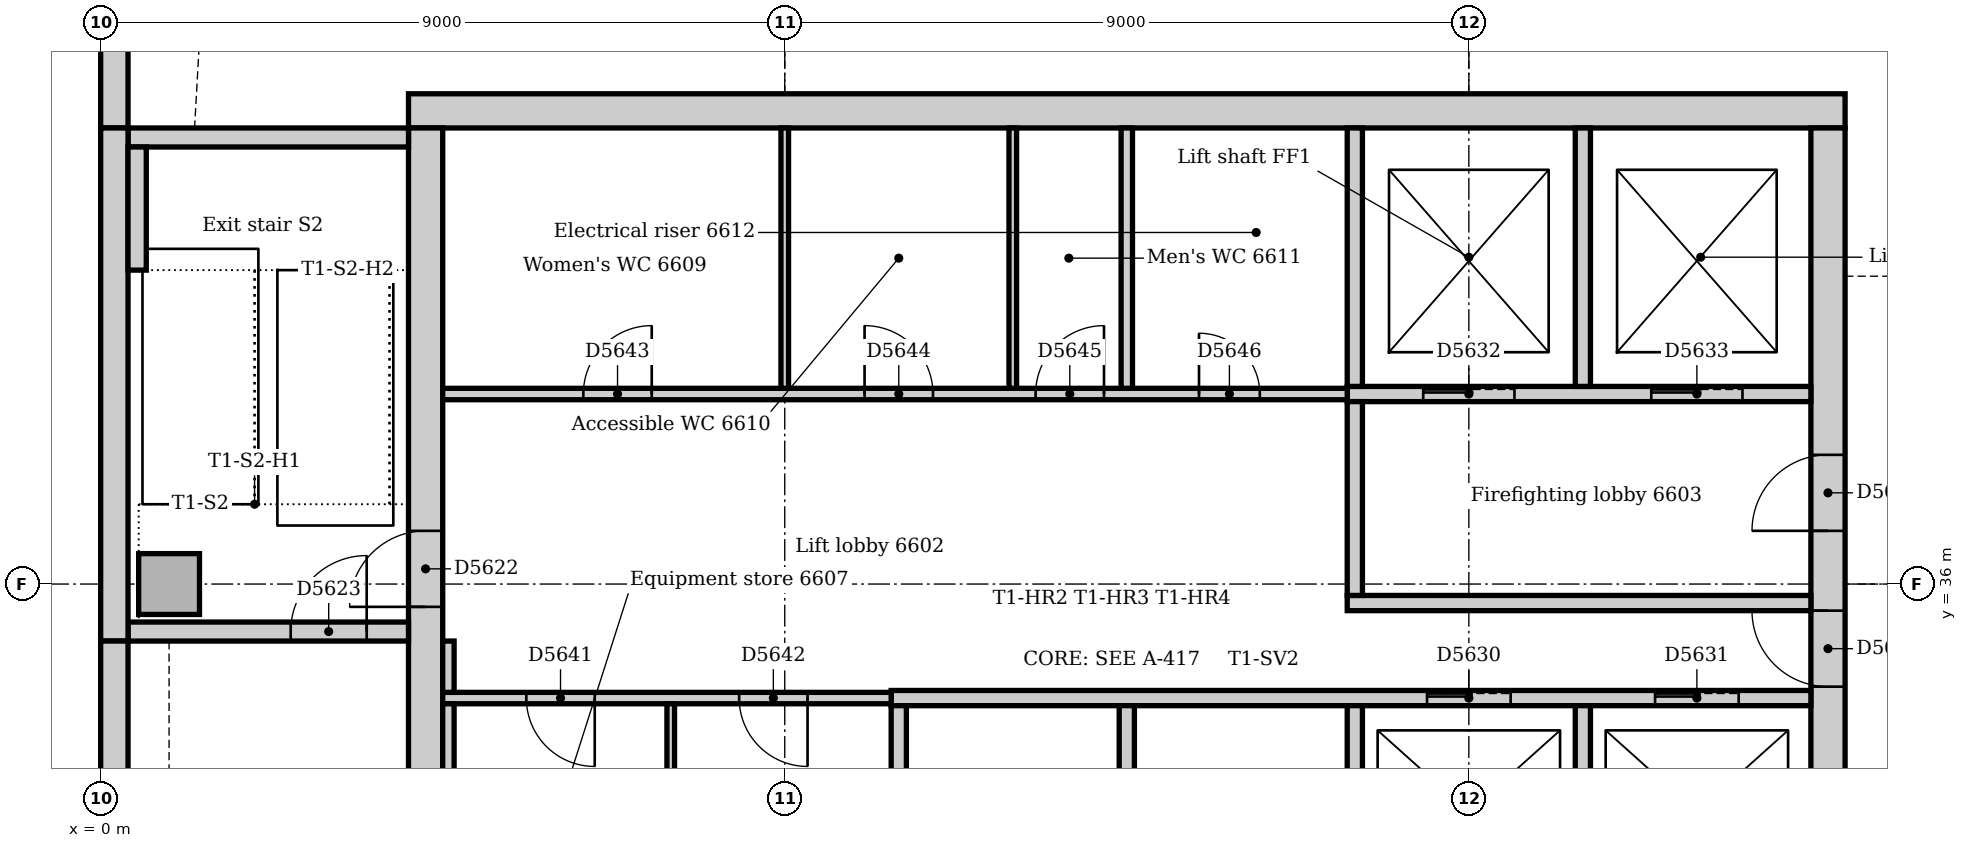
"""IFC4 building model, lengths in metres.
Left out: names, types, materials, properties, quantities, classifications, styles, units other than length and angle.
Written with IfcOpenShell. Run it as: python <this file> out.ifc"""

import sys

from ifc_helpers import new_model, si_unit, direction, frame, frame_2d, origin, origin_2d, place, context, subcontext, project, spatial, rectangle, extrude, element, fill, save


model = new_model("IFC4")
c1 = context("Model", 3, precision=1e-05, world=origin(), true_north=direction((0.0, 1.0)))
c2 = subcontext(c1, "Body", "Model", "MODEL_VIEW")
j1 = project(units=[si_unit("LENGTHUNIT", "METRE"), si_unit("PLANEANGLEUNIT", "RADIAN")], contexts=[c1])
p1 = place(None, origin())
s1 = spatial("IfcSite", under=j1, at=p1, CompositionType="ELEMENT")
p2 = place(p1, origin())
s2 = spatial("IfcBuilding", under=s1, at=p2, CompositionType="ELEMENT")
p3 = place(p2, frame((0.0, 0.0, 275.0)))
s3 = spatial("IfcBuildingStorey", under=s2, at=p3, CompositionType="ELEMENT", Elevation=275.0)
p4 = place(p3, frame((22.95, 42.225, 0.0), z_axis=(0.0, 0.0, 1.0), x_axis=(-1.0, 0.0, 0.0)))
e1 = element("IfcWall", 1, at=p4, inside=s3, PredefinedType="SOLIDWALL", context=c2, shape_type="SweptSolid", body=[
    extrude(rectangle(XDim=18.9, YDim=0.45, at=frame_2d((9.45, 0.0))), origin(), (0.0, 0.0, 1.0), 4.0),
])
p5 = place(p3, frame((22.725, 31.5, 0.0), z_axis=(0.0, 0.0, 1.0), x_axis=(0.0, 1.0, 0.0)))
e2 = element("IfcWall", 2, at=p5, inside=s3, PredefinedType="SOLIDWALL", context=c2, shape_type="SweptSolid", body=[
    extrude(rectangle(XDim=10.5, YDim=0.45, at=frame_2d((5.25, 0.0))), origin(), (0.0, 0.0, 1.0), 4.0),
])
p6 = place(p5, frame((3.15, 0.0, 0.0)))
e3 = element("IfcOpeningElement", 3, at=p6, cuts=e2, PredefinedType="OPENING", context=c2, shape_type="SweptSolid", body=[
    extrude(rectangle(XDim=1.0, YDim=2.1, at=frame_2d((0.5, 1.05))), frame((0.0, 0.235, 0.0), z_axis=(0.0, -1.0, 0.0), x_axis=(1.0, 0.0, 0.0)), (0.0, 0.0, 1.0), 0.47),
])
p7 = place(p5, frame((5.2, 0.0, 0.0)))
e4 = element("IfcOpeningElement", 4, at=p7, cuts=e2, PredefinedType="OPENING", context=c2, shape_type="SweptSolid", body=[
    extrude(rectangle(XDim=1.0, YDim=2.1, at=frame_2d((0.5, 1.05))), frame((0.0, 0.235, 0.0), z_axis=(0.0, -1.0, 0.0), x_axis=(1.0, 0.0, 0.0)), (0.0, 0.0, 1.0), 0.47),
])
p8 = place(p3, frame((4.275, 42.0, 0.0), z_axis=(0.0, 0.0, 1.0), x_axis=(0.0, -1.0, 0.0)))
e5 = element("IfcWall", 5, at=p8, inside=s3, PredefinedType="SOLIDWALL", context=c2, shape_type="SweptSolid", body=[
    extrude(rectangle(XDim=10.5, YDim=0.45, at=frame_2d((5.25, 0.0))), origin(), (0.0, 0.0, 1.0), 4.0),
])
p9 = place(p8, frame((5.3, 0.0, 0.0)))
e6 = element("IfcOpeningElement", 6, at=p9, cuts=e5, PredefinedType="OPENING", context=c2, shape_type="SweptSolid", body=[
    extrude(rectangle(XDim=1.0, YDim=2.1, at=frame_2d((0.5, 1.05))), frame((0.0, 0.235, 0.0), z_axis=(0.0, -1.0, 0.0), x_axis=(1.0, 0.0, 0.0)), (0.0, 0.0, 1.0), 0.47),
])
p10 = place(p3, frame((0.36, 35.375, 0.0), z_axis=(0.0, 0.0, 1.0), x_axis=(1.0, 0.0, 0.0)))
e7 = element("IfcWall", 7, at=p10, inside=s3, PredefinedType="SOLIDWALL", context=c2, shape_type="SweptSolid", body=[
    extrude(rectangle(XDim=3.69, YDim=0.25, at=frame_2d((1.845, 0.0))), origin(), (0.0, 0.0, 1.0), 4.0),
])
p11 = place(p10, frame((2.14, 0.0, 0.0)))
e8 = element("IfcOpeningElement", 8, at=p11, cuts=e7, PredefinedType="OPENING", context=c2, shape_type="SweptSolid", body=[
    extrude(rectangle(XDim=1.0, YDim=2.1, at=frame_2d((0.5, 1.05))), frame((0.0, 0.135, 0.0), z_axis=(0.0, -1.0, 0.0), x_axis=(1.0, 0.0, 0.0)), (0.0, 0.0, 1.0), 0.27),
])
p12 = place(p3, frame((4.05, 41.875, 0.0), z_axis=(0.0, 0.0, 1.0), x_axis=(-1.0, 0.0, 0.0)))
e9 = element("IfcWall", 9, at=p12, inside=s3, PredefinedType="SOLIDWALL", context=c2, shape_type="SweptSolid", body=[
    extrude(rectangle(XDim=3.69, YDim=0.25, at=frame_2d((1.845, 0.0))), origin(), (0.0, 0.0, 1.0), 4.0),
])
p13 = place(p3, frame((0.9, 36.0, 0.0), z_axis=(0.0, 0.0, 1.0), x_axis=(1.0, 0.0, 0.0)))
e10 = element("IfcColumn", 10, at=p13, inside=s3, PredefinedType="COLUMN", context=c2, shape_type="SweptSolid", body=[
    extrude(rectangle(XDim=0.8, YDim=0.8, at=origin_2d()), origin(), (0.0, 0.0, 1.0), 4.0),
])
p14 = place(p3, frame((0.18, 58.757, 0.0), z_axis=(0.0, 0.0, 1.0), x_axis=(0.0, -1.0, 0.0)))
e11 = element("IfcWall", 11, at=p14, inside=s3, PredefinedType="STANDARD", context=c2, shape_type="SweptSolid", body=[
    extrude(rectangle(XDim=16.757, YDim=0.36, at=frame_2d((8.379, 0.0))), origin(), (0.0, 0.0, 1.0), 3.85),
])
p15 = place(p14, frame((3.107, 0.0, 0.9)))
e12 = element("IfcOpeningElement", 12, at=p15, cuts=e11, PredefinedType="OPENING", context=c2, shape_type="SweptSolid", body=[
    extrude(rectangle(XDim=3.3, YDim=1.6, at=frame_2d((1.65, 0.8))), frame((0.0, 0.19, 0.0), z_axis=(0.0, -1.0, 0.0), x_axis=(1.0, 0.0, 0.0)), (0.0, 0.0, 1.0), 0.38),
])
p16 = place(p14, frame((7.607, 0.0, 0.9)))
e13 = element("IfcOpeningElement", 13, at=p16, cuts=e11, PredefinedType="OPENING", context=c2, shape_type="SweptSolid", body=[
    extrude(rectangle(XDim=3.3, YDim=1.6, at=frame_2d((1.65, 0.8))), frame((0.0, 0.19, 0.0), z_axis=(0.0, -1.0, 0.0), x_axis=(1.0, 0.0, 0.0)), (0.0, 0.0, 1.0), 0.38),
])
p17 = place(p14, frame((12.107, 0.0, 0.9)))
e14 = element("IfcOpeningElement", 14, at=p17, cuts=e11, PredefinedType="OPENING", context=c2, shape_type="SweptSolid", body=[
    extrude(rectangle(XDim=3.3, YDim=1.6, at=frame_2d((1.65, 0.8))), frame((0.0, 0.19, 0.0), z_axis=(0.0, -1.0, 0.0), x_axis=(1.0, 0.0, 0.0)), (0.0, 0.0, 1.0), 0.38),
])
p18 = place(p3, frame((0.18, 42.0, 0.0), z_axis=(0.0, 0.0, 1.0), x_axis=(0.0, -1.0, 0.0)))
e15 = element("IfcWall", 15, at=p18, inside=s3, PredefinedType="STANDARD", context=c2, shape_type="SweptSolid", body=[
    extrude(rectangle(XDim=6.75, YDim=0.36, at=frame_2d((3.375, 0.0))), origin(), (0.0, 0.0, 1.0), 3.85),
])
p19 = place(p3, frame((0.18, 35.25, 0.0), z_axis=(0.0, 0.0, 1.0), x_axis=(0.0, -1.0, 0.0)))
e16 = element("IfcWall", 16, at=p19, inside=s3, PredefinedType="STANDARD", context=c2, shape_type="SweptSolid", body=[
    extrude(rectangle(XDim=7.5, YDim=0.36, at=frame_2d((3.75, 0.0))), origin(), (0.0, 0.0, 1.0), 3.85),
])
p20 = place(p3, frame((0.48, 40.13, 0.0), z_axis=(0.0, 0.0, 1.0), x_axis=(0.0, 1.0, 0.0)))
e17 = element("IfcWall", 17, at=p20, inside=s3, PredefinedType="STANDARD", context=c2, shape_type="SweptSolid", body=[
    extrude(rectangle(XDim=1.62, YDim=0.24, at=frame_2d((0.81, 0.0))), origin(), (0.0, 0.0, 1.0), 4.0),
])
p21 = place(p3, frame((16.4, 35.75, 0.0), z_axis=(0.0, 0.0, 1.0), x_axis=(1.0, 0.0, 0.0)))
e18 = element("IfcWall", 18, at=p21, inside=s3, PredefinedType="PARTITIONING", context=c2, shape_type="SweptSolid", body=[
    extrude(rectangle(XDim=6.1, YDim=0.2, at=frame_2d((3.05, 0.0))), origin(), (0.0, 0.0, 1.0), 3.85),
])
p22 = place(p3, frame((16.4, 38.5, 0.0), z_axis=(0.0, 0.0, 1.0), x_axis=(1.0, 0.0, 0.0)))
e19 = element("IfcWall", 19, at=p22, inside=s3, PredefinedType="PARTITIONING", context=c2, shape_type="SweptSolid", body=[
    extrude(rectangle(XDim=6.1, YDim=0.2, at=frame_2d((3.05, 0.0))), origin(), (0.0, 0.0, 1.0), 3.85),
])
p23 = place(p22, frame((1.0, 0.0, 0.0)))
e20 = element("IfcOpeningElement", 20, at=p23, cuts=e19, PredefinedType="OPENING", context=c2, shape_type="SweptSolid", body=[
    extrude(rectangle(XDim=1.2, YDim=2.1, at=frame_2d((0.6, 1.05))), frame((0.0, 0.11, 0.0), z_axis=(0.0, -1.0, 0.0), x_axis=(1.0, 0.0, 0.0)), (0.0, 0.0, 1.0), 0.22),
])
p24 = place(p22, frame((4.0, 0.0, 0.0)))
e21 = element("IfcOpeningElement", 21, at=p24, cuts=e19, PredefinedType="OPENING", context=c2, shape_type="SweptSolid", body=[
    extrude(rectangle(XDim=1.2, YDim=2.1, at=frame_2d((0.6, 1.05))), frame((0.0, 0.11, 0.0), z_axis=(0.0, -1.0, 0.0), x_axis=(1.0, 0.0, 0.0)), (0.0, 0.0, 1.0), 0.22),
])
p25 = place(p3, frame((16.5, 35.85, 0.0), z_axis=(0.0, 0.0, 1.0), x_axis=(0.0, 1.0, 0.0)))
e22 = element("IfcWall", 22, at=p25, inside=s3, PredefinedType="PARTITIONING", context=c2, shape_type="SweptSolid", body=[
    extrude(rectangle(XDim=2.55, YDim=0.2, at=frame_2d((1.275, 0.0))), origin(), (0.0, 0.0, 1.0), 3.85),
])
p26 = place(p3, frame((10.4, 34.5, 0.0), z_axis=(0.0, 0.0, 1.0), x_axis=(1.0, 0.0, 0.0)))
e23 = element("IfcWall", 23, at=p26, inside=s3, PredefinedType="PARTITIONING", context=c2, shape_type="SweptSolid", body=[
    extrude(rectangle(XDim=12.1, YDim=0.2, at=frame_2d((6.05, 0.0))), origin(), (0.0, 0.0, 1.0), 3.85),
])
p27 = place(p26, frame((7.05, 0.0, 0.0)))
e24 = element("IfcOpeningElement", 24, at=p27, cuts=e23, PredefinedType="OPENING", context=c2, shape_type="SweptSolid", body=[
    extrude(rectangle(XDim=1.1, YDim=2.1, at=frame_2d((0.55, 1.05))), frame((0.0, 0.11, 0.0), z_axis=(0.0, -1.0, 0.0), x_axis=(1.0, 0.0, 0.0)), (0.0, 0.0, 1.0), 0.22),
])
p28 = place(p26, frame((10.05, 0.0, 0.0)))
e25 = element("IfcOpeningElement", 25, at=p28, cuts=e23, PredefinedType="OPENING", context=c2, shape_type="SweptSolid", body=[
    extrude(rectangle(XDim=1.1, YDim=2.1, at=frame_2d((0.55, 1.05))), frame((0.0, 0.11, 0.0), z_axis=(0.0, -1.0, 0.0), x_axis=(1.0, 0.0, 0.0)), (0.0, 0.0, 1.0), 0.22),
])
for number, where, z_axis, x_axis in (
    (26, (10.5, 31.75, 0.0), (0.0, 0.0, 1.0), (0.0, 1.0, 0.0)),
    (27, (13.5, 31.75, 0.0), (0.0, 0.0, 1.0), (0.0, 1.0, 0.0)),
    (28, (16.5, 31.75, 0.0), (0.0, 0.0, 1.0), (0.0, 1.0, 0.0)),
    (29, (19.5, 31.75, 0.0), (0.0, 0.0, 1.0), (0.0, 1.0, 0.0)),
):
    element("IfcWall", number, at=place(p3, frame(where, z_axis=z_axis, x_axis=x_axis)), inside=s3, PredefinedType="PARTITIONING", context=c2, shape_type="SweptSolid", body=[
        extrude(rectangle(XDim=2.65, YDim=0.2, at=frame_2d((1.325, 0.0))), origin(), (0.0, 0.0, 1.0), 3.85),
    ])
for number, where, z_axis, x_axis in (
    (30, (16.5, 38.6, 0.0), (0.0, 0.0, 1.0), (0.0, 1.0, 0.0)),
    (31, (19.5, 38.6, 0.0), (0.0, 0.0, 1.0), (0.0, 1.0, 0.0)),
):
    element("IfcWall", number, at=place(p3, frame(where, z_axis=z_axis, x_axis=x_axis)), inside=s3, PredefinedType="PARTITIONING", context=c2, shape_type="SweptSolid", body=[
        extrude(rectangle(XDim=3.4, YDim=0.2, at=frame_2d((1.7, 0.0))), origin(), (0.0, 0.0, 1.0), 3.85),
    ])
p29 = place(p3, frame((4.5, 38.5, 0.0), z_axis=(0.0, 0.0, 1.0), x_axis=(1.0, 0.0, 0.0)))
e32 = element("IfcWall", 32, at=p29, inside=s3, PredefinedType="PARTITIONING", context=c2, shape_type="SweptSolid", body=[
    extrude(rectangle(XDim=11.9, YDim=0.15, at=frame_2d((5.95, 0.0))), origin(), (0.0, 0.0, 1.0), 3.85),
])
p30 = place(p29, frame((1.85, 0.0, 0.0)))
e33 = element("IfcOpeningElement", 33, at=p30, cuts=e32, PredefinedType="OPENING", context=c2, shape_type="SweptSolid", body=[
    extrude(rectangle(XDim=0.9, YDim=2.1, at=frame_2d((0.45, 1.05))), frame((0.0, 0.085, 0.0), z_axis=(0.0, -1.0, 0.0), x_axis=(1.0, 0.0, 0.0)), (0.0, 0.0, 1.0), 0.17),
])
p31 = place(p29, frame((5.55, 0.0, 0.0)))
e34 = element("IfcOpeningElement", 34, at=p31, cuts=e32, PredefinedType="OPENING", context=c2, shape_type="SweptSolid", body=[
    extrude(rectangle(XDim=0.9, YDim=2.1, at=frame_2d((0.45, 1.05))), frame((0.0, 0.085, 0.0), z_axis=(0.0, -1.0, 0.0), x_axis=(1.0, 0.0, 0.0)), (0.0, 0.0, 1.0), 0.17),
])
p32 = place(p29, frame((7.8, 0.0, 0.0)))
e35 = element("IfcOpeningElement", 35, at=p32, cuts=e32, PredefinedType="OPENING", context=c2, shape_type="SweptSolid", body=[
    extrude(rectangle(XDim=0.9, YDim=2.1, at=frame_2d((0.45, 1.05))), frame((0.0, 0.085, 0.0), z_axis=(0.0, -1.0, 0.0), x_axis=(1.0, 0.0, 0.0)), (0.0, 0.0, 1.0), 0.17),
])
p33 = place(p29, frame((9.95, 0.0, 0.0)))
e36 = element("IfcOpeningElement", 36, at=p33, cuts=e32, PredefinedType="OPENING", context=c2, shape_type="SweptSolid", body=[
    extrude(rectangle(XDim=0.8, YDim=2.1, at=frame_2d((0.4, 1.05))), frame((0.0, 0.085, 0.0), z_axis=(0.0, -1.0, 0.0), x_axis=(1.0, 0.0, 0.0)), (0.0, 0.0, 1.0), 0.17),
])
p34 = place(p3, frame((4.5, 34.5, 0.0), z_axis=(0.0, 0.0, 1.0), x_axis=(1.0, 0.0, 0.0)))
e37 = element("IfcWall", 37, at=p34, inside=s3, PredefinedType="PARTITIONING", context=c2, shape_type="SweptSolid", body=[
    extrude(rectangle(XDim=5.9, YDim=0.15, at=frame_2d((2.95, 0.0))), origin(), (0.0, 0.0, 1.0), 3.85),
])
p35 = place(p34, frame((1.1, 0.0, 0.0)))
e38 = element("IfcOpeningElement", 38, at=p35, cuts=e37, PredefinedType="OPENING", context=c2, shape_type="SweptSolid", body=[
    extrude(rectangle(XDim=0.9, YDim=2.1, at=frame_2d((0.45, 1.05))), frame((0.0, 0.085, 0.0), z_axis=(0.0, -1.0, 0.0), x_axis=(1.0, 0.0, 0.0)), (0.0, 0.0, 1.0), 0.17),
])
p36 = place(p34, frame((3.9, 0.0, 0.0)))
e39 = element("IfcOpeningElement", 39, at=p36, cuts=e37, PredefinedType="OPENING", context=c2, shape_type="SweptSolid", body=[
    extrude(rectangle(XDim=0.9, YDim=2.1, at=frame_2d((0.45, 1.05))), frame((0.0, 0.085, 0.0), z_axis=(0.0, -1.0, 0.0), x_axis=(1.0, 0.0, 0.0)), (0.0, 0.0, 1.0), 0.17),
])
p37 = place(p3, frame((4.575, 34.575, 0.0), z_axis=(0.0, 0.0, 1.0), x_axis=(0.0, 1.0, 0.0)))
e40 = element("IfcWall", 40, at=p37, inside=s3, PredefinedType="PARTITIONING", context=c2, shape_type="SweptSolid", body=[
    extrude(rectangle(XDim=0.675, YDim=0.15, at=frame_2d((0.338, 0.0))), origin(), (0.0, 0.0, 1.0), 3.85),
])
p38 = place(p3, frame((4.575, 31.75, 0.0), z_axis=(0.0, 0.0, 1.0), x_axis=(0.0, 1.0, 0.0)))
e41 = element("IfcWall", 41, at=p38, inside=s3, PredefinedType="PARTITIONING", context=c2, shape_type="SweptSolid", body=[
    extrude(rectangle(XDim=2.675, YDim=0.15, at=frame_2d((1.337, 0.0))), origin(), (0.0, 0.0, 1.0), 3.85),
])
p39 = place(p3, frame((13.5, 38.575, 0.0), z_axis=(0.0, 0.0, 1.0), x_axis=(0.0, 1.0, 0.0)))
e42 = element("IfcWall", 42, at=p39, inside=s3, PredefinedType="PARTITIONING", context=c2, shape_type="SweptSolid", body=[
    extrude(rectangle(XDim=3.425, YDim=0.15, at=frame_2d((1.712, 0.0))), origin(), (0.0, 0.0, 1.0), 3.85),
])
for number, where, z_axis, x_axis in (
    (43, (9.0, 38.575, 0.0), (0.0, 0.0, 1.0), (0.0, 1.0, 0.0)),
    (44, (12.0, 38.575, 0.0), (0.0, 0.0, 1.0), (0.0, 1.0, 0.0)),
):
    element("IfcWall", number, at=place(p3, frame(where, z_axis=z_axis, x_axis=x_axis)), inside=s3, PredefinedType="PARTITIONING", context=c2, shape_type="SweptSolid", body=[
        extrude(rectangle(XDim=3.425, YDim=0.1, at=frame_2d((1.712, 0.0))), origin(), (0.0, 0.0, 1.0), 3.85),
    ])
p40 = place(p3, frame((7.5, 31.75, 0.0), z_axis=(0.0, 0.0, 1.0), x_axis=(0.0, 1.0, 0.0)))
e45 = element("IfcWall", 45, at=p40, inside=s3, PredefinedType="PARTITIONING", context=c2, shape_type="SweptSolid", body=[
    extrude(rectangle(XDim=2.675, YDim=0.1, at=frame_2d((1.337, 0.0))), origin(), (0.0, 0.0, 1.0), 3.85),
])
p41 = place(p9, frame((1.0, 0.0, 0.0), z_axis=(0.0, 0.0, 1.0), x_axis=(-1.0, 0.0, 0.0)))
e46 = element("IfcDoor", 46, at=p41, inside=s3, OperationType="SINGLE_SWING_LEFT", PredefinedType="DOOR", context=c2, shape_type="SweptSolid", body=[
    extrude(rectangle(XDim=1.0, YDim=2.1, at=frame_2d((0.5, 1.05))), frame((0.0, 0.025, 0.0), z_axis=(0.0, -1.0, 0.0), x_axis=(1.0, 0.0, 0.0)), (0.0, 0.0, 1.0), 0.05),
])
fill(e6, e46)
p42 = place(p11, origin())
e47 = element("IfcDoor", 47, at=p42, inside=s3, OperationType="SINGLE_SWING_RIGHT", PredefinedType="DOOR", context=c2, shape_type="SweptSolid", body=[
    extrude(rectangle(XDim=1.0, YDim=2.1, at=frame_2d((0.5, 1.05))), frame((0.0, 0.025, 0.0), z_axis=(0.0, -1.0, 0.0), x_axis=(1.0, 0.0, 0.0)), (0.0, 0.0, 1.0), 0.05),
])
fill(e8, e47)
p43 = place(p27, origin())
e48 = element("IfcDoor", 48, at=p43, inside=s3, OperationType="SLIDING_TO_LEFT", PredefinedType="DOOR", context=c2, shape_type="SweptSolid", body=[
    extrude(rectangle(XDim=1.1, YDim=2.1, at=frame_2d((0.55, 1.05))), frame((0.0, 0.025, 0.0), z_axis=(0.0, -1.0, 0.0), x_axis=(1.0, 0.0, 0.0)), (0.0, 0.0, 1.0), 0.05),
])
fill(e24, e48)
p44 = place(p28, origin())
e49 = element("IfcDoor", 49, at=p44, inside=s3, OperationType="SLIDING_TO_LEFT", PredefinedType="DOOR", context=c2, shape_type="SweptSolid", body=[
    extrude(rectangle(XDim=1.1, YDim=2.1, at=frame_2d((0.55, 1.05))), frame((0.0, 0.025, 0.0), z_axis=(0.0, -1.0, 0.0), x_axis=(1.0, 0.0, 0.0)), (0.0, 0.0, 1.0), 0.05),
])
fill(e25, e49)
p45 = place(p23, origin())
e50 = element("IfcDoor", 50, at=p45, inside=s3, OperationType="SLIDING_TO_LEFT", PredefinedType="DOOR", context=c2, shape_type="SweptSolid", body=[
    extrude(rectangle(XDim=1.2, YDim=2.1, at=frame_2d((0.6, 1.05))), frame((0.0, 0.025, 0.0), z_axis=(0.0, -1.0, 0.0), x_axis=(1.0, 0.0, 0.0)), (0.0, 0.0, 1.0), 0.05),
])
fill(e20, e50)
p46 = place(p24, origin())
e51 = element("IfcDoor", 51, at=p46, inside=s3, OperationType="SLIDING_TO_LEFT", PredefinedType="DOOR", context=c2, shape_type="SweptSolid", body=[
    extrude(rectangle(XDim=1.2, YDim=2.1, at=frame_2d((0.6, 1.05))), frame((0.0, 0.025, 0.0), z_axis=(0.0, -1.0, 0.0), x_axis=(1.0, 0.0, 0.0)), (0.0, 0.0, 1.0), 0.05),
])
fill(e21, e51)
p47 = place(p6, origin())
e52 = element("IfcDoor", 52, at=p47, inside=s3, OperationType="SINGLE_SWING_RIGHT", PredefinedType="DOOR", context=c2, shape_type="SweptSolid", body=[
    extrude(rectangle(XDim=1.0, YDim=2.1, at=frame_2d((0.5, 1.05))), frame((0.0, 0.025, 0.0), z_axis=(0.0, -1.0, 0.0), x_axis=(1.0, 0.0, 0.0)), (0.0, 0.0, 1.0), 0.05),
])
fill(e3, e52)
p48 = place(p7, origin())
e53 = element("IfcDoor", 53, at=p48, inside=s3, OperationType="SINGLE_SWING_LEFT", PredefinedType="DOOR", context=c2, shape_type="SweptSolid", body=[
    extrude(rectangle(XDim=1.0, YDim=2.1, at=frame_2d((0.5, 1.05))), frame((0.0, 0.025, 0.0), z_axis=(0.0, -1.0, 0.0), x_axis=(1.0, 0.0, 0.0)), (0.0, 0.0, 1.0), 0.05),
])
fill(e4, e53)
p49 = place(p35, frame((0.9, 0.0, 0.0), z_axis=(0.0, 0.0, 1.0), x_axis=(-1.0, 0.0, 0.0)))
e54 = element("IfcDoor", 54, at=p49, inside=s3, OperationType="SINGLE_SWING_LEFT", PredefinedType="DOOR", context=c2, shape_type="SweptSolid", body=[
    extrude(rectangle(XDim=0.9, YDim=2.1, at=frame_2d((0.45, 1.05))), frame((0.0, 0.025, 0.0), z_axis=(0.0, -1.0, 0.0), x_axis=(1.0, 0.0, 0.0)), (0.0, 0.0, 1.0), 0.05),
])
fill(e38, e54)
p50 = place(p36, frame((0.9, 0.0, 0.0), z_axis=(0.0, 0.0, 1.0), x_axis=(-1.0, 0.0, 0.0)))
e55 = element("IfcDoor", 55, at=p50, inside=s3, OperationType="SINGLE_SWING_LEFT", PredefinedType="DOOR", context=c2, shape_type="SweptSolid", body=[
    extrude(rectangle(XDim=0.9, YDim=2.1, at=frame_2d((0.45, 1.05))), frame((0.0, 0.025, 0.0), z_axis=(0.0, -1.0, 0.0), x_axis=(1.0, 0.0, 0.0)), (0.0, 0.0, 1.0), 0.05),
])
fill(e39, e55)
p51 = place(p30, origin())
e56 = element("IfcDoor", 56, at=p51, inside=s3, OperationType="SINGLE_SWING_RIGHT", PredefinedType="DOOR", context=c2, shape_type="SweptSolid", body=[
    extrude(rectangle(XDim=0.9, YDim=2.1, at=frame_2d((0.45, 1.05))), frame((0.0, 0.025, 0.0), z_axis=(0.0, -1.0, 0.0), x_axis=(1.0, 0.0, 0.0)), (0.0, 0.0, 1.0), 0.05),
])
fill(e33, e56)
p52 = place(p31, origin())
e57 = element("IfcDoor", 57, at=p52, inside=s3, OperationType="SINGLE_SWING_LEFT", PredefinedType="DOOR", context=c2, shape_type="SweptSolid", body=[
    extrude(rectangle(XDim=0.9, YDim=2.1, at=frame_2d((0.45, 1.05))), frame((0.0, 0.025, 0.0), z_axis=(0.0, -1.0, 0.0), x_axis=(1.0, 0.0, 0.0)), (0.0, 0.0, 1.0), 0.05),
])
fill(e34, e57)
p53 = place(p32, origin())
e58 = element("IfcDoor", 58, at=p53, inside=s3, OperationType="SINGLE_SWING_RIGHT", PredefinedType="DOOR", context=c2, shape_type="SweptSolid", body=[
    extrude(rectangle(XDim=0.9, YDim=2.1, at=frame_2d((0.45, 1.05))), frame((0.0, 0.025, 0.0), z_axis=(0.0, -1.0, 0.0), x_axis=(1.0, 0.0, 0.0)), (0.0, 0.0, 1.0), 0.05),
])
fill(e35, e58)
p54 = place(p33, origin())
e59 = element("IfcDoor", 59, at=p54, inside=s3, OperationType="SINGLE_SWING_LEFT", PredefinedType="DOOR", context=c2, shape_type="SweptSolid", body=[
    extrude(rectangle(XDim=0.8, YDim=2.1, at=frame_2d((0.4, 1.05))), frame((0.0, 0.025, 0.0), z_axis=(0.0, -1.0, 0.0), x_axis=(1.0, 0.0, 0.0)), (0.0, 0.0, 1.0), 0.05),
])
fill(e36, e59)
save(model, sys.argv[1])
